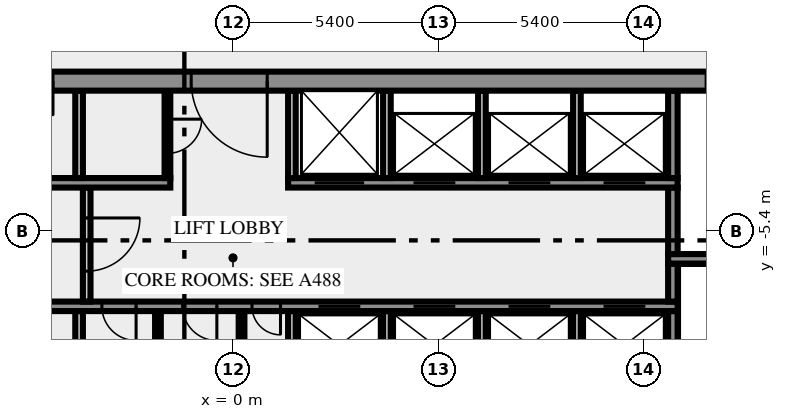
"""IFC4 building model, lengths in metres.
Left out: names, types, materials, properties, quantities, classifications, styles, units other than length and angle.
Written with IfcOpenShell. Run it as: python <this file> out.ifc"""

import sys

from ifc_helpers import new_model, si_unit, direction, frame, frame_2d, origin, place, context, subcontext, project, spatial, rectangle, extrude, element, fill, save


model = new_model("IFC4")
c1 = context("Model", 3, precision=1e-05, world=origin(), true_north=direction((0.0, 1.0)))
c2 = subcontext(c1, "Body", "Model", "MODEL_VIEW")
j1 = project(units=[si_unit("LENGTHUNIT", "METRE"), si_unit("PLANEANGLEUNIT", "RADIAN")], contexts=[c1])
p1 = place(None, origin())
s1 = spatial("IfcSite", under=j1, at=p1, CompositionType="ELEMENT")
p2 = place(p1, origin())
s2 = spatial("IfcBuilding", under=s1, at=p2, CompositionType="ELEMENT")
p3 = place(p2, frame((0.0, 0.0, 184.0)))
s3 = spatial("IfcBuildingStorey", under=s2, at=p3, CompositionType="ELEMENT", Elevation=184.0)
p4 = place(p3, frame((-4.05, -10.5, 0.0), z_axis=(0.0, 0.0, 1.0), x_axis=(0.0, 1.0, 0.0)))
e1 = element("IfcWall", 1, at=p4, inside=s3, PredefinedType="SOLIDWALL", context=c2, shape_type="SweptSolid", body=[
    extrude(rectangle(XDim=3.0, YDim=0.2, at=frame_2d((1.5, 0.0))), origin(), (0.0, 0.0, 1.0), 3.4),
])
for number, where, z_axis, x_axis in (
    (2, (-1.975, -10.5, 0.0), (0.0, 0.0, 1.0), (0.0, 1.0, 0.0)),
    (3, (0.225, -10.5, 0.0), (0.0, 0.0, 1.0), (0.0, 1.0, 0.0)),
):
    element("IfcWall", number, at=place(p3, frame(where, z_axis=z_axis, x_axis=x_axis)), inside=s3, PredefinedType="PARTITIONING", context=c2, shape_type="SweptSolid", body=[
        extrude(rectangle(XDim=3.0, YDim=0.15, at=frame_2d((1.5, 0.0))), origin(), (0.0, 0.0, 1.0), 3.4),
    ])
for number, where, z_axis, x_axis in (
    (4, (1.55, -10.5, 0.0), (0.0, 0.0, 1.0), (0.0, 1.0, 0.0)),
    (5, (4.05, -10.5, 0.0), (0.0, 0.0, 1.0), (0.0, 1.0, 0.0)),
    (6, (6.55, -10.5, 0.0), (0.0, 0.0, 1.0), (0.0, 1.0, 0.0)),
    (7, (9.05, -10.5, 0.0), (0.0, 0.0, 1.0), (0.0, 1.0, 0.0)),
):
    element("IfcWall", number, at=place(p3, frame(where, z_axis=z_axis, x_axis=x_axis)), inside=s3, PredefinedType="SOLIDWALL", context=c2, shape_type="SweptSolid", body=[
        extrude(rectangle(XDim=3.0, YDim=0.2, at=frame_2d((1.5, 0.0))), origin(), (0.0, 0.0, 1.0), 3.4),
    ])
p5 = place(p3, frame((11.575, -10.5, 0.0), z_axis=(0.0, 0.0, 1.0), x_axis=(0.0, 1.0, 0.0)))
e8 = element("IfcWall", 8, at=p5, inside=s3, PredefinedType="SHEAR", context=c2, shape_type="SweptSolid", body=[
    extrude(rectangle(XDim=3.0, YDim=0.25, at=frame_2d((1.5, 0.0))), origin(), (0.0, 0.0, 1.0), 3.4),
])
p6 = place(p3, frame((11.7, -7.375, 0.0), z_axis=(0.0, 0.0, 1.0), x_axis=(-1.0, 0.0, 0.0)))
e9 = element("IfcWall", 9, at=p6, inside=s3, PredefinedType="SHEAR", context=c2, shape_type="SweptSolid", body=[
    extrude(rectangle(XDim=23.4, YDim=0.25, at=frame_2d((11.7, 0.0))), origin(), (0.0, 0.0, 1.0), 3.4),
])
p7 = place(p6, frame((20.613, 0.0, 0.0)))
e10 = element("IfcOpeningElement", 10, at=p7, cuts=e9, PredefinedType="OPENING", context=c2, shape_type="SweptSolid", body=[
    extrude(rectangle(XDim=0.9, YDim=2.1, at=frame_2d((0.45, 1.05))), frame((0.0, 0.135, 0.0), z_axis=(0.0, -1.0, 0.0), x_axis=(1.0, 0.0, 0.0)), (0.0, 0.0, 1.0), 0.27),
])
p8 = place(p6, frame((16.888, 0.0, 0.0)))
e11 = element("IfcOpeningElement", 11, at=p8, cuts=e9, PredefinedType="OPENING", context=c2, shape_type="SweptSolid", body=[
    extrude(rectangle(XDim=0.9, YDim=2.1, at=frame_2d((0.45, 1.05))), frame((0.0, 0.135, 0.0), z_axis=(0.0, -1.0, 0.0), x_axis=(1.0, 0.0, 0.0)), (0.0, 0.0, 1.0), 0.27),
])
p9 = place(p6, frame((14.25, 0.0, 0.0)))
e12 = element("IfcOpeningElement", 12, at=p9, cuts=e9, PredefinedType="OPENING", context=c2, shape_type="SweptSolid", body=[
    extrude(rectangle(XDim=0.9, YDim=2.1, at=frame_2d((0.45, 1.05))), frame((0.0, 0.135, 0.0), z_axis=(0.0, -1.0, 0.0), x_axis=(1.0, 0.0, 0.0)), (0.0, 0.0, 1.0), 0.27),
])
p10 = place(p6, frame((12.125, 0.0, 0.0)))
e13 = element("IfcOpeningElement", 13, at=p10, cuts=e9, PredefinedType="OPENING", context=c2, shape_type="SweptSolid", body=[
    extrude(rectangle(XDim=0.9, YDim=2.1, at=frame_2d((0.45, 1.05))), frame((0.0, 0.135, 0.0), z_axis=(0.0, -1.0, 0.0), x_axis=(1.0, 0.0, 0.0)), (0.0, 0.0, 1.0), 0.27),
])
p11 = place(p6, frame((10.45, 0.0, 0.0)))
e14 = element("IfcOpeningElement", 14, at=p11, cuts=e9, PredefinedType="OPENING", context=c2, shape_type="SweptSolid", body=[
    extrude(rectangle(XDim=0.75, YDim=2.1, at=frame_2d((0.375, 1.05))), frame((0.0, 0.135, 0.0), z_axis=(0.0, -1.0, 0.0), x_axis=(1.0, 0.0, 0.0)), (0.0, 0.0, 1.0), 0.27),
])
p12 = place(p6, frame((8.35, 0.0, 0.0)))
e15 = element("IfcOpeningElement", 15, at=p12, cuts=e9, PredefinedType="OPENING", context=c2, shape_type="SweptSolid", body=[
    extrude(rectangle(XDim=1.1, YDim=2.1, at=frame_2d((0.55, 1.05))), frame((0.0, 0.135, 0.0), z_axis=(0.0, -1.0, 0.0), x_axis=(1.0, 0.0, 0.0)), (0.0, 0.0, 1.0), 0.27),
])
p13 = place(p6, frame((5.85, 0.0, 0.0)))
e16 = element("IfcOpeningElement", 16, at=p13, cuts=e9, PredefinedType="OPENING", context=c2, shape_type="SweptSolid", body=[
    extrude(rectangle(XDim=1.1, YDim=2.1, at=frame_2d((0.55, 1.05))), frame((0.0, 0.135, 0.0), z_axis=(0.0, -1.0, 0.0), x_axis=(1.0, 0.0, 0.0)), (0.0, 0.0, 1.0), 0.27),
])
p14 = place(p6, frame((3.35, 0.0, 0.0)))
e17 = element("IfcOpeningElement", 17, at=p14, cuts=e9, PredefinedType="OPENING", context=c2, shape_type="SweptSolid", body=[
    extrude(rectangle(XDim=1.1, YDim=2.1, at=frame_2d((0.55, 1.05))), frame((0.0, 0.135, 0.0), z_axis=(0.0, -1.0, 0.0), x_axis=(1.0, 0.0, 0.0)), (0.0, 0.0, 1.0), 0.27),
])
p15 = place(p6, frame((0.85, 0.0, 0.0)))
e18 = element("IfcOpeningElement", 18, at=p15, cuts=e9, PredefinedType="OPENING", context=c2, shape_type="SweptSolid", body=[
    extrude(rectangle(XDim=1.1, YDim=2.1, at=frame_2d((0.55, 1.05))), frame((0.0, 0.135, 0.0), z_axis=(0.0, -1.0, 0.0), x_axis=(1.0, 0.0, 0.0)), (0.0, 0.0, 1.0), 0.27),
])
p16 = place(p3, frame((-3.85, -4.25, 0.0), z_axis=(0.0, 0.0, 1.0), x_axis=(0.0, -1.0, 0.0)))
e19 = element("IfcWall", 19, at=p16, inside=s3, PredefinedType="SOLIDWALL", context=c2, shape_type="SweptSolid", body=[
    extrude(rectangle(XDim=3.0, YDim=0.2, at=frame_2d((1.5, 0.0))), origin(), (0.0, 0.0, 1.0), 3.4),
])
p17 = place(p16, frame((0.8, 0.0, 0.0)))
e20 = element("IfcOpeningElement", 20, at=p17, cuts=e19, PredefinedType="OPENING", context=c2, shape_type="SweptSolid", body=[
    extrude(rectangle(XDim=1.4, YDim=2.1, at=frame_2d((0.7, 1.05))), frame((0.0, 0.11, 0.0), z_axis=(0.0, -1.0, 0.0), x_axis=(1.0, 0.0, 0.0)), (0.0, 0.0, 1.0), 0.22),
])
p18 = place(p3, frame((11.575, -7.25, 0.0), z_axis=(0.0, 0.0, 1.0), x_axis=(0.0, 1.0, 0.0)))
e21 = element("IfcWall", 21, at=p18, inside=s3, PredefinedType="SHEAR", context=c2, shape_type="SweptSolid", body=[
    extrude(rectangle(XDim=1.0, YDim=0.25, at=frame_2d((0.5, 0.0))), origin(), (0.0, 0.0, 1.0), 3.4),
])
p19 = place(p3, frame((19.5, -6.125, 0.0), z_axis=(0.0, 0.0, 1.0), x_axis=(-1.0, 0.0, 0.0)))
e22 = element("IfcWall", 22, at=p19, inside=s3, PredefinedType="SHEAR", context=c2, shape_type="SweptSolid", body=[
    extrude(rectangle(XDim=8.05, YDim=0.25, at=frame_2d((4.025, 0.0))), origin(), (0.0, 0.0, 1.0), 3.4),
])
p20 = place(p19, frame((0.05, 0.0, 0.0)))
e23 = element("IfcOpeningElement", 23, at=p20, cuts=e22, PredefinedType="OPENING", context=c2, shape_type="SweptSolid", body=[
    extrude(rectangle(XDim=1.8, YDim=2.1, at=frame_2d((0.9, 1.05))), frame((0.0, 0.135, 0.0), z_axis=(0.0, -1.0, 0.0), x_axis=(1.0, 0.0, 0.0)), (0.0, 0.0, 1.0), 0.27),
])
p21 = place(p3, frame((11.575, -6.0, 0.0), z_axis=(0.0, 0.0, 1.0), x_axis=(0.0, 1.0, 0.0)))
e24 = element("IfcWall", 24, at=p21, inside=s3, PredefinedType="SHEAR", context=c2, shape_type="SweptSolid", body=[
    extrude(rectangle(XDim=1.75, YDim=0.25, at=frame_2d((0.875, 0.0))), origin(), (0.0, 0.0, 1.0), 3.4),
])
p22 = place(p3, frame((-11.7, -4.125, 0.0), z_axis=(0.0, 0.0, 1.0), x_axis=(1.0, 0.0, 0.0)))
e25 = element("IfcWall", 25, at=p22, inside=s3, PredefinedType="SHEAR", context=c2, shape_type="SweptSolid", body=[
    extrude(rectangle(XDim=10.05, YDim=0.25, at=frame_2d((5.025, 0.0))), origin(), (0.0, 0.0, 1.0), 3.4),
])
p23 = place(p3, frame((1.45, -4.125, 0.0), z_axis=(0.0, 0.0, 1.0), x_axis=(1.0, 0.0, 0.0)))
e26 = element("IfcWall", 26, at=p23, inside=s3, PredefinedType="SHEAR", context=c2, shape_type="SweptSolid", body=[
    extrude(rectangle(XDim=10.25, YDim=0.25, at=frame_2d((5.125, 0.0))), origin(), (0.0, 0.0, 1.0), 3.4),
])
p24 = place(p23, frame((0.7, 0.0, 0.0)))
e27 = element("IfcOpeningElement", 27, at=p24, cuts=e26, PredefinedType="OPENING", context=c2, shape_type="SweptSolid", body=[
    extrude(rectangle(XDim=1.3, YDim=2.1, at=frame_2d((0.65, 1.05))), frame((0.0, 0.135, 0.0), z_axis=(0.0, -1.0, 0.0), x_axis=(1.0, 0.0, 0.0)), (0.0, 0.0, 1.0), 0.27),
])
p25 = place(p23, frame((3.3, 0.0, 0.0)))
e28 = element("IfcOpeningElement", 28, at=p25, cuts=e26, PredefinedType="OPENING", context=c2, shape_type="SweptSolid", body=[
    extrude(rectangle(XDim=1.1, YDim=2.1, at=frame_2d((0.55, 1.05))), frame((0.0, 0.135, 0.0), z_axis=(0.0, -1.0, 0.0), x_axis=(1.0, 0.0, 0.0)), (0.0, 0.0, 1.0), 0.27),
])
p26 = place(p23, frame((5.8, 0.0, 0.0)))
e29 = element("IfcOpeningElement", 29, at=p26, cuts=e26, PredefinedType="OPENING", context=c2, shape_type="SweptSolid", body=[
    extrude(rectangle(XDim=1.1, YDim=2.1, at=frame_2d((0.55, 1.05))), frame((0.0, 0.135, 0.0), z_axis=(0.0, -1.0, 0.0), x_axis=(1.0, 0.0, 0.0)), (0.0, 0.0, 1.0), 0.27),
])
p27 = place(p23, frame((8.3, 0.0, 0.0)))
e30 = element("IfcOpeningElement", 30, at=p27, cuts=e26, PredefinedType="OPENING", context=c2, shape_type="SweptSolid", body=[
    extrude(rectangle(XDim=1.1, YDim=2.1, at=frame_2d((0.55, 1.05))), frame((0.0, 0.135, 0.0), z_axis=(0.0, -1.0, 0.0), x_axis=(1.0, 0.0, 0.0)), (0.0, 0.0, 1.0), 0.27),
])
p28 = place(p3, frame((-4.05, -4.0, 0.0), z_axis=(0.0, 0.0, 1.0), x_axis=(0.0, 1.0, 0.0)))
e31 = element("IfcWall", 31, at=p28, inside=s3, PredefinedType="SOLIDWALL", context=c2, shape_type="SweptSolid", body=[
    extrude(rectangle(XDim=2.3, YDim=0.2, at=frame_2d((1.15, 0.0))), origin(), (0.0, 0.0, 1.0), 3.4),
])
p29 = place(p3, frame((-1.725, -1.7, 0.0), z_axis=(0.0, 0.0, 1.0), x_axis=(0.0, -1.0, 0.0)))
e32 = element("IfcWall", 32, at=p29, inside=s3, PredefinedType="PARTITIONING", context=c2, shape_type="SweptSolid", body=[
    extrude(rectangle(XDim=2.3, YDim=0.15, at=frame_2d((1.15, 0.0))), origin(), (0.0, 0.0, 1.0), 3.4),
])
p30 = place(p29, frame((0.75, 0.0, 0.0)))
e33 = element("IfcOpeningElement", 33, at=p30, cuts=e32, PredefinedType="OPENING", context=c2, shape_type="SweptSolid", body=[
    extrude(rectangle(XDim=0.9, YDim=2.1, at=frame_2d((0.45, 1.05))), frame((0.0, 0.085, 0.0), z_axis=(0.0, -1.0, 0.0), x_axis=(1.0, 0.0, 0.0)), (0.0, 0.0, 1.0), 0.17),
])
for number, where, z_axis, x_axis in (
    (34, (1.55, -4.0, 0.0), (0.0, 0.0, 1.0), (0.0, 1.0, 0.0)),
    (35, (4.05, -4.0, 0.0), (0.0, 0.0, 1.0), (0.0, 1.0, 0.0)),
    (36, (6.55, -4.0, 0.0), (0.0, 0.0, 1.0), (0.0, 1.0, 0.0)),
    (37, (9.05, -4.0, 0.0), (0.0, 0.0, 1.0), (0.0, 1.0, 0.0)),
):
    element("IfcWall", number, at=place(p3, frame(where, z_axis=z_axis, x_axis=x_axis)), inside=s3, PredefinedType="SOLIDWALL", context=c2, shape_type="SweptSolid", body=[
        extrude(rectangle(XDim=2.3, YDim=0.2, at=frame_2d((1.15, 0.0))), origin(), (0.0, 0.0, 1.0), 3.4),
    ])
p31 = place(p3, frame((11.575, -4.0, 0.0), z_axis=(0.0, 0.0, 1.0), x_axis=(0.0, 1.0, 0.0)))
e38 = element("IfcWall", 38, at=p31, inside=s3, PredefinedType="SHEAR", context=c2, shape_type="SweptSolid", body=[
    extrude(rectangle(XDim=2.3, YDim=0.25, at=frame_2d((1.15, 0.0))), origin(), (0.0, 0.0, 1.0), 3.4),
])
p32 = place(p3, frame((20.49, -1.45, 0.0), z_axis=(0.0, 0.0, 1.0), x_axis=(-1.0, 0.0, 0.0)))
e39 = element("IfcWall", 39, at=p32, inside=s3, PredefinedType="SHEAR", context=c2, shape_type="SweptSolid", body=[
    extrude(rectangle(XDim=40.98, YDim=0.5, at=frame_2d((20.49, 0.0))), origin(), (0.0, 0.0, 1.0), 3.4),
])
p33 = place(p32, frame((38.14, 0.0, 0.0)))
e40 = element("IfcOpeningElement", 40, at=p33, cuts=e39, PredefinedType="OPENING", context=c2, shape_type="SweptSolid", body=[
    extrude(rectangle(XDim=1.8, YDim=2.1, at=frame_2d((0.9, 1.05))), frame((0.0, 0.26, 0.0), z_axis=(0.0, -1.0, 0.0), x_axis=(1.0, 0.0, 0.0)), (0.0, 0.0, 1.0), 0.52),
])
p34 = place(p32, frame((35.89, 0.0, 0.0)))
e41 = element("IfcOpeningElement", 41, at=p34, cuts=e39, PredefinedType="OPENING", context=c2, shape_type="SweptSolid", body=[
    extrude(rectangle(XDim=0.9, YDim=2.1, at=frame_2d((0.45, 1.05))), frame((0.0, 0.26, 0.0), z_axis=(0.0, -1.0, 0.0), x_axis=(1.0, 0.0, 0.0)), (0.0, 0.0, 1.0), 0.52),
])
p35 = place(p32, frame((32.94, 0.0, 0.0)))
e42 = element("IfcOpeningElement", 42, at=p35, cuts=e39, PredefinedType="OPENING", context=c2, shape_type="SweptSolid", body=[
    extrude(rectangle(XDim=0.9, YDim=2.1, at=frame_2d((0.45, 1.05))), frame((0.0, 0.26, 0.0), z_axis=(0.0, -1.0, 0.0), x_axis=(1.0, 0.0, 0.0)), (0.0, 0.0, 1.0), 0.52),
])
p36 = place(p32, frame((30.802, 0.0, 0.0)))
e43 = element("IfcOpeningElement", 43, at=p36, cuts=e39, PredefinedType="OPENING", context=c2, shape_type="SweptSolid", body=[
    extrude(rectangle(XDim=0.9, YDim=2.1, at=frame_2d((0.45, 1.05))), frame((0.0, 0.26, 0.0), z_axis=(0.0, -1.0, 0.0), x_axis=(1.0, 0.0, 0.0)), (0.0, 0.0, 1.0), 0.52),
])
p37 = place(p32, frame((29.24, 0.0, 0.0)))
e44 = element("IfcOpeningElement", 44, at=p37, cuts=e39, PredefinedType="OPENING", context=c2, shape_type="SweptSolid", body=[
    extrude(rectangle(XDim=0.9, YDim=2.1, at=frame_2d((0.45, 1.05))), frame((0.0, 0.26, 0.0), z_axis=(0.0, -1.0, 0.0), x_axis=(1.0, 0.0, 0.0)), (0.0, 0.0, 1.0), 0.52),
])
p38 = place(p32, frame((27.39, 0.0, 0.0)))
e45 = element("IfcOpeningElement", 45, at=p38, cuts=e39, PredefinedType="OPENING", context=c2, shape_type="SweptSolid", body=[
    extrude(rectangle(XDim=0.9, YDim=2.1, at=frame_2d((0.45, 1.05))), frame((0.0, 0.26, 0.0), z_axis=(0.0, -1.0, 0.0), x_axis=(1.0, 0.0, 0.0)), (0.0, 0.0, 1.0), 0.52),
])
p39 = place(p32, frame((25.228, 0.0, 0.0)))
e46 = element("IfcOpeningElement", 46, at=p39, cuts=e39, PredefinedType="OPENING", context=c2, shape_type="SweptSolid", body=[
    extrude(rectangle(XDim=0.9, YDim=2.1, at=frame_2d((0.45, 1.05))), frame((0.0, 0.26, 0.0), z_axis=(0.0, -1.0, 0.0), x_axis=(1.0, 0.0, 0.0)), (0.0, 0.0, 1.0), 0.52),
])
p40 = place(p32, frame((19.59, 0.0, 0.0)))
e47 = element("IfcOpeningElement", 47, at=p40, cuts=e39, PredefinedType="OPENING", context=c2, shape_type="SweptSolid", body=[
    extrude(rectangle(XDim=2.0, YDim=2.1, at=frame_2d((1.0, 1.05))), frame((0.0, 0.26, 0.0), z_axis=(0.0, -1.0, 0.0), x_axis=(1.0, 0.0, 0.0)), (0.0, 0.0, 1.0), 0.52),
])
p41 = place(p32, frame((7.14, 0.0, 0.0)))
e48 = element("IfcOpeningElement", 48, at=p41, cuts=e39, PredefinedType="OPENING", context=c2, shape_type="SweptSolid", body=[
    extrude(rectangle(XDim=0.9, YDim=2.1, at=frame_2d((0.45, 1.05))), frame((0.0, 0.26, 0.0), z_axis=(0.0, -1.0, 0.0), x_axis=(1.0, 0.0, 0.0)), (0.0, 0.0, 1.0), 0.52),
])
p42 = place(p32, frame((5.028, 0.0, 0.0)))
e49 = element("IfcOpeningElement", 49, at=p42, cuts=e39, PredefinedType="OPENING", context=c2, shape_type="SweptSolid", body=[
    extrude(rectangle(XDim=0.8, YDim=2.1, at=frame_2d((0.4, 1.05))), frame((0.0, 0.26, 0.0), z_axis=(0.0, -1.0, 0.0), x_axis=(1.0, 0.0, 0.0)), (0.0, 0.0, 1.0), 0.52),
])
p43 = place(p32, frame((3.452, 0.0, 0.0)))
e50 = element("IfcOpeningElement", 50, at=p43, cuts=e39, PredefinedType="OPENING", context=c2, shape_type="SweptSolid", body=[
    extrude(rectangle(XDim=0.8, YDim=2.1, at=frame_2d((0.4, 1.05))), frame((0.0, 0.26, 0.0), z_axis=(0.0, -1.0, 0.0), x_axis=(1.0, 0.0, 0.0)), (0.0, 0.0, 1.0), 0.52),
])
p44 = place(p32, frame((1.04, 0.0, 0.0)))
e51 = element("IfcOpeningElement", 51, at=p44, cuts=e39, PredefinedType="OPENING", context=c2, shape_type="SweptSolid", body=[
    extrude(rectangle(XDim=1.8, YDim=2.1, at=frame_2d((0.9, 1.05))), frame((0.0, 0.26, 0.0), z_axis=(0.0, -1.0, 0.0), x_axis=(1.0, 0.0, 0.0)), (0.0, 0.0, 1.0), 0.52),
])
p45 = place(p9, origin())
e52 = element("IfcDoor", 52, at=p45, inside=s3, OperationType="SINGLE_SWING_RIGHT", PredefinedType="DOOR", context=c2, shape_type="SweptSolid", body=[
    extrude(rectangle(XDim=0.9, YDim=2.1, at=frame_2d((0.45, 1.05))), frame((0.0, 0.025, 0.0), z_axis=(0.0, -1.0, 0.0), x_axis=(1.0, 0.0, 0.0)), (0.0, 0.0, 1.0), 0.05),
])
fill(e12, e52)
p46 = place(p10, origin())
e53 = element("IfcDoor", 53, at=p46, inside=s3, OperationType="SINGLE_SWING_RIGHT", PredefinedType="DOOR", context=c2, shape_type="SweptSolid", body=[
    extrude(rectangle(XDim=0.9, YDim=2.1, at=frame_2d((0.45, 1.05))), frame((0.0, 0.025, 0.0), z_axis=(0.0, -1.0, 0.0), x_axis=(1.0, 0.0, 0.0)), (0.0, 0.0, 1.0), 0.05),
])
fill(e13, e53)
p47 = place(p11, origin())
e54 = element("IfcDoor", 54, at=p47, inside=s3, OperationType="SINGLE_SWING_LEFT", PredefinedType="DOOR", context=c2, shape_type="SweptSolid", body=[
    extrude(rectangle(XDim=0.75, YDim=2.1, at=frame_2d((0.375, 1.05))), frame((0.0, 0.025, 0.0), z_axis=(0.0, -1.0, 0.0), x_axis=(1.0, 0.0, 0.0)), (0.0, 0.0, 1.0), 0.05),
])
fill(e14, e54)
p48 = place(p12, origin())
e55 = element("IfcDoor", 55, at=p48, inside=s3, OperationType="DOUBLE_DOOR_SLIDING", PredefinedType="DOOR", context=c2, shape_type="SweptSolid", body=[
    extrude(rectangle(XDim=1.1, YDim=2.1, at=frame_2d((0.55, 1.05))), frame((0.0, 0.025, 0.0), z_axis=(0.0, -1.0, 0.0), x_axis=(1.0, 0.0, 0.0)), (0.0, 0.0, 1.0), 0.05),
])
fill(e15, e55)
p49 = place(p13, origin())
e56 = element("IfcDoor", 56, at=p49, inside=s3, OperationType="DOUBLE_DOOR_SLIDING", PredefinedType="DOOR", context=c2, shape_type="SweptSolid", body=[
    extrude(rectangle(XDim=1.1, YDim=2.1, at=frame_2d((0.55, 1.05))), frame((0.0, 0.025, 0.0), z_axis=(0.0, -1.0, 0.0), x_axis=(1.0, 0.0, 0.0)), (0.0, 0.0, 1.0), 0.05),
])
fill(e16, e56)
p50 = place(p14, origin())
e57 = element("IfcDoor", 57, at=p50, inside=s3, OperationType="DOUBLE_DOOR_SLIDING", PredefinedType="DOOR", context=c2, shape_type="SweptSolid", body=[
    extrude(rectangle(XDim=1.1, YDim=2.1, at=frame_2d((0.55, 1.05))), frame((0.0, 0.025, 0.0), z_axis=(0.0, -1.0, 0.0), x_axis=(1.0, 0.0, 0.0)), (0.0, 0.0, 1.0), 0.05),
])
fill(e17, e57)
p51 = place(p15, origin())
e58 = element("IfcDoor", 58, at=p51, inside=s3, OperationType="DOUBLE_DOOR_SLIDING", PredefinedType="DOOR", context=c2, shape_type="SweptSolid", body=[
    extrude(rectangle(XDim=1.1, YDim=2.1, at=frame_2d((0.55, 1.05))), frame((0.0, 0.025, 0.0), z_axis=(0.0, -1.0, 0.0), x_axis=(1.0, 0.0, 0.0)), (0.0, 0.0, 1.0), 0.05),
])
fill(e18, e58)
p52 = place(p17, origin())
e59 = element("IfcDoor", 59, at=p52, inside=s3, OperationType="DOUBLE_DOOR_SINGLE_SWING", PredefinedType="DOOR", context=c2, shape_type="SweptSolid", body=[
    extrude(rectangle(XDim=1.4, YDim=2.1, at=frame_2d((0.7, 1.05))), frame((0.0, 0.025, 0.0), z_axis=(0.0, -1.0, 0.0), x_axis=(1.0, 0.0, 0.0)), (0.0, 0.0, 1.0), 0.05),
])
fill(e20, e59)
p53 = place(p24, origin())
e60 = element("IfcDoor", 60, at=p53, inside=s3, OperationType="DOUBLE_DOOR_SLIDING", PredefinedType="DOOR", context=c2, shape_type="SweptSolid", body=[
    extrude(rectangle(XDim=1.3, YDim=2.1, at=frame_2d((0.65, 1.05))), frame((0.0, 0.025, 0.0), z_axis=(0.0, -1.0, 0.0), x_axis=(1.0, 0.0, 0.0)), (0.0, 0.0, 1.0), 0.05),
])
fill(e27, e60)
p54 = place(p25, origin())
e61 = element("IfcDoor", 61, at=p54, inside=s3, OperationType="DOUBLE_DOOR_SLIDING", PredefinedType="DOOR", context=c2, shape_type="SweptSolid", body=[
    extrude(rectangle(XDim=1.1, YDim=2.1, at=frame_2d((0.55, 1.05))), frame((0.0, 0.025, 0.0), z_axis=(0.0, -1.0, 0.0), x_axis=(1.0, 0.0, 0.0)), (0.0, 0.0, 1.0), 0.05),
])
fill(e28, e61)
p55 = place(p26, origin())
e62 = element("IfcDoor", 62, at=p55, inside=s3, OperationType="DOUBLE_DOOR_SLIDING", PredefinedType="DOOR", context=c2, shape_type="SweptSolid", body=[
    extrude(rectangle(XDim=1.1, YDim=2.1, at=frame_2d((0.55, 1.05))), frame((0.0, 0.025, 0.0), z_axis=(0.0, -1.0, 0.0), x_axis=(1.0, 0.0, 0.0)), (0.0, 0.0, 1.0), 0.05),
])
fill(e29, e62)
p56 = place(p27, origin())
e63 = element("IfcDoor", 63, at=p56, inside=s3, OperationType="DOUBLE_DOOR_SLIDING", PredefinedType="DOOR", context=c2, shape_type="SweptSolid", body=[
    extrude(rectangle(XDim=1.1, YDim=2.1, at=frame_2d((0.55, 1.05))), frame((0.0, 0.025, 0.0), z_axis=(0.0, -1.0, 0.0), x_axis=(1.0, 0.0, 0.0)), (0.0, 0.0, 1.0), 0.05),
])
fill(e30, e63)
p57 = place(p30, origin())
e64 = element("IfcDoor", 64, at=p57, inside=s3, OperationType="SINGLE_SWING_RIGHT", PredefinedType="DOOR", context=c2, shape_type="SweptSolid", body=[
    extrude(rectangle(XDim=0.9, YDim=2.1, at=frame_2d((0.45, 1.05))), frame((0.0, 0.025, 0.0), z_axis=(0.0, -1.0, 0.0), x_axis=(1.0, 0.0, 0.0)), (0.0, 0.0, 1.0), 0.05),
])
fill(e33, e64)
p58 = place(p39, origin())
e65 = element("IfcDoor", 65, at=p58, inside=s3, OperationType="SINGLE_SWING_RIGHT", PredefinedType="DOOR", context=c2, shape_type="SweptSolid", body=[
    extrude(rectangle(XDim=0.9, YDim=2.1, at=frame_2d((0.45, 1.05))), frame((0.0, 0.025, 0.0), z_axis=(0.0, -1.0, 0.0), x_axis=(1.0, 0.0, 0.0)), (0.0, 0.0, 1.0), 0.05),
])
fill(e46, e65)
p59 = place(p40, origin())
e66 = element("IfcDoor", 66, at=p59, inside=s3, OperationType="DOUBLE_DOOR_SINGLE_SWING", PredefinedType="DOOR", context=c2, shape_type="SweptSolid", body=[
    extrude(rectangle(XDim=2.0, YDim=2.1, at=frame_2d((1.0, 1.05))), frame((0.0, 0.025, 0.0), z_axis=(0.0, -1.0, 0.0), x_axis=(1.0, 0.0, 0.0)), (0.0, 0.0, 1.0), 0.05),
])
fill(e47, e66)
save(model, sys.argv[1])
